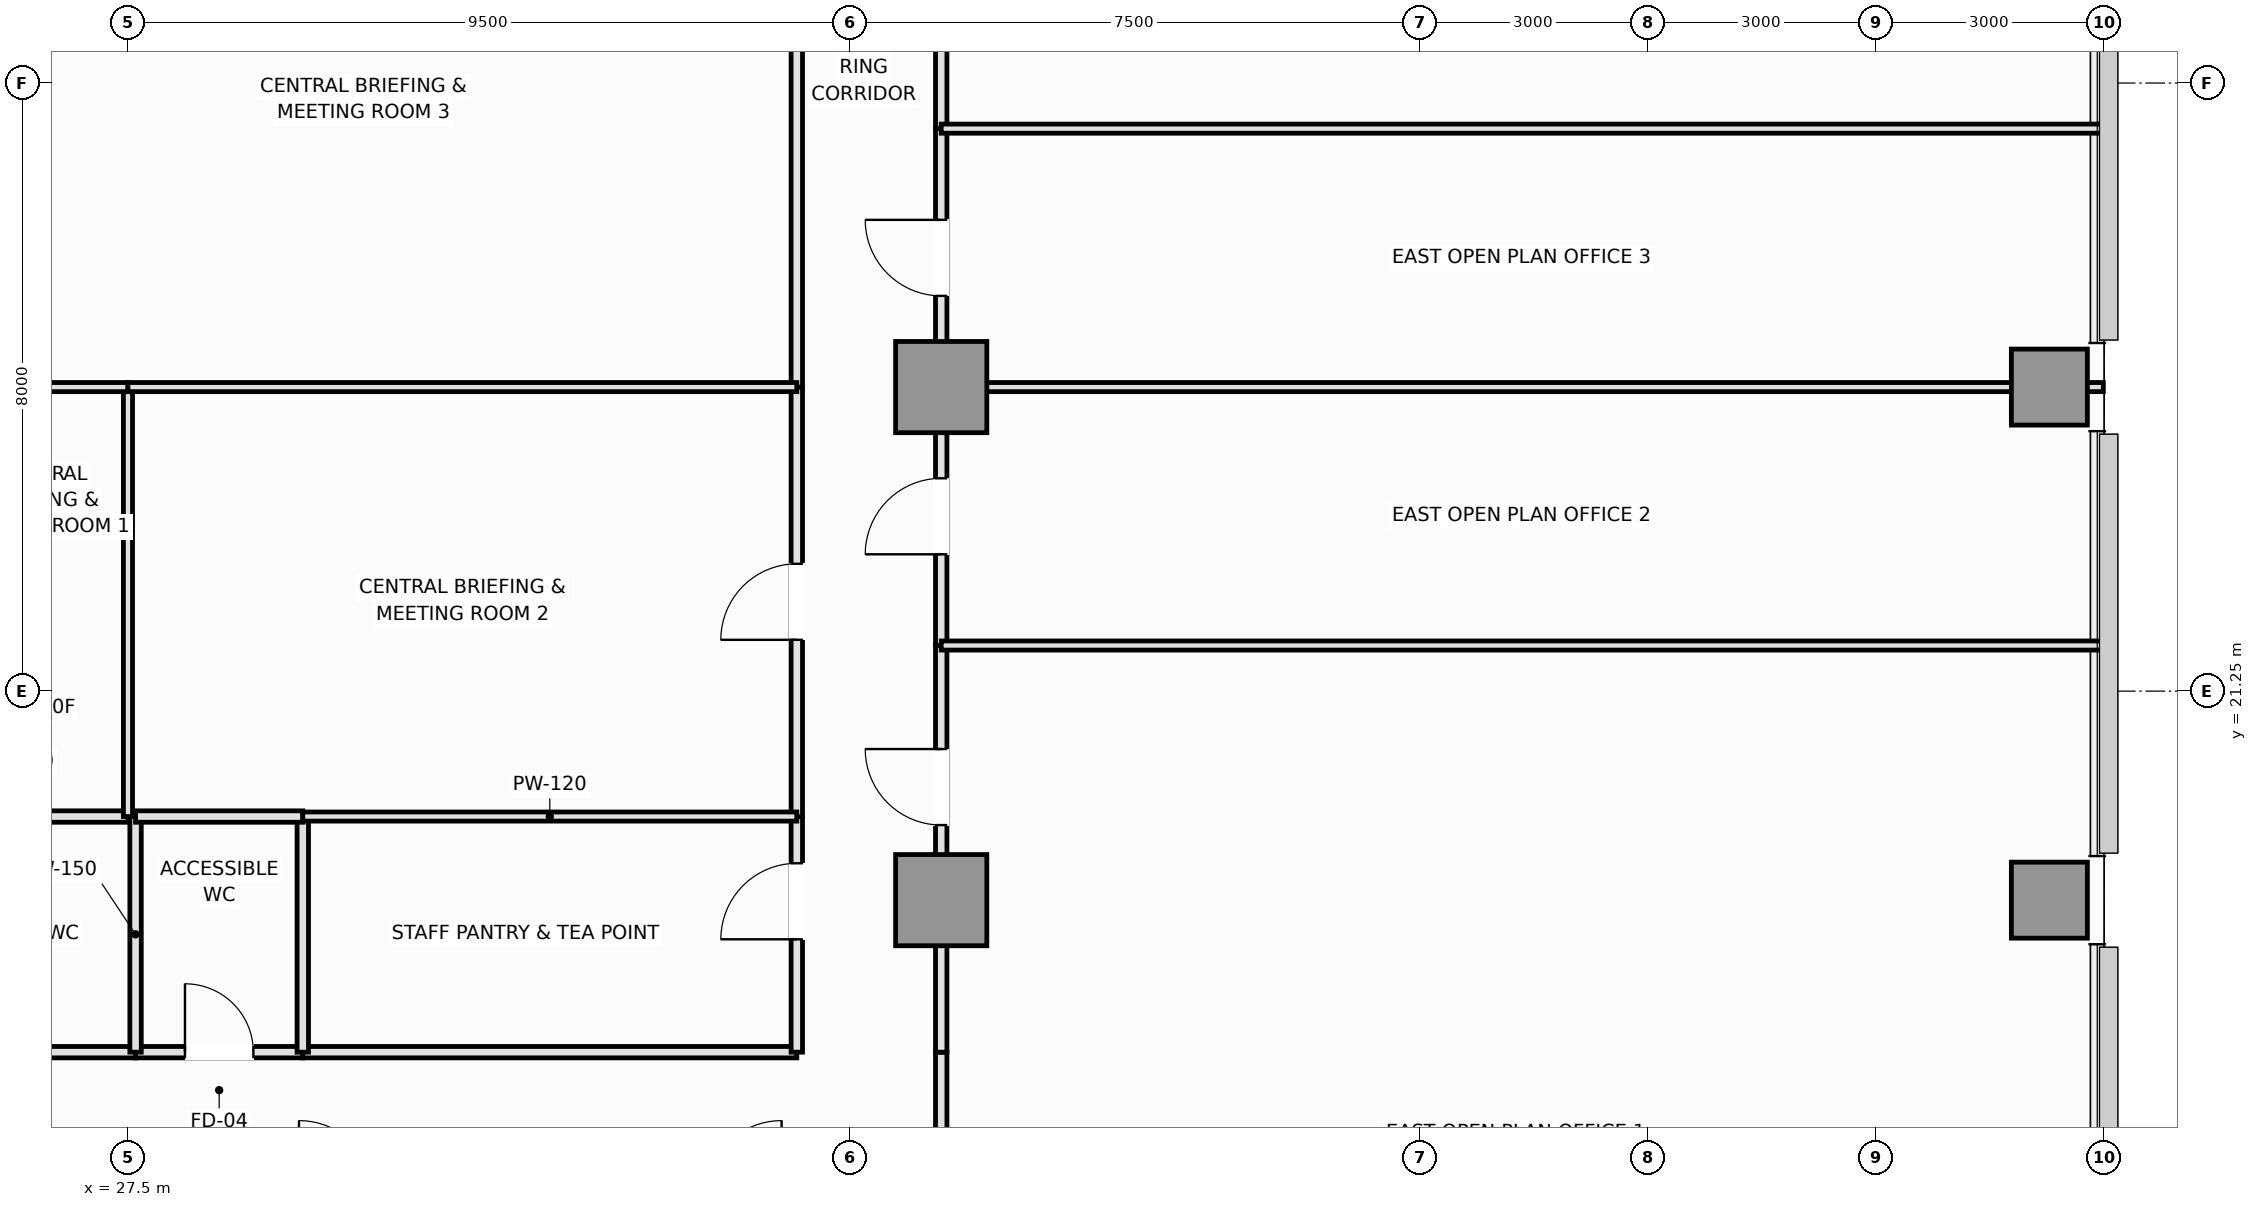
"""IFC4 building model, lengths in metres.
Left out: names, types, materials, properties, quantities, classifications, styles, units other than length and angle.
Written with IfcOpenShell. Run it as: python <this file> out.ifc"""

import sys

from ifc_helpers import new_model, si_unit, direction, frame, frame_2d, origin, origin_2d, place, context, subcontext, project, spatial, rectangle, extrude, element, fill, save


model = new_model("IFC4")
c1 = context("Model", 3, precision=1e-05, world=origin(), true_north=direction((0.0, 1.0)))
c2 = subcontext(c1, "Body", "Model", "MODEL_VIEW")
j1 = project(units=[si_unit("LENGTHUNIT", "METRE"), si_unit("PLANEANGLEUNIT", "RADIAN")], contexts=[c1])
p1 = place(None, origin())
s1 = spatial("IfcSite", under=j1, at=p1, CompositionType="ELEMENT")
p2 = place(p1, origin())
s2 = spatial("IfcBuilding", under=s1, at=p2, CompositionType="ELEMENT")
p3 = place(p2, frame((0.0, 0.0, 57.55)))
s3 = spatial("IfcBuildingStorey", under=s2, at=p3, CompositionType="ELEMENT", Elevation=57.55)
for number, where, z_axis, x_axis in (
    (1, (38.2, 18.5, 0.0), (0.0, 0.0, 1.0), (1.0, 0.0, 0.0)),
    (2, (38.2, 25.25, 0.0), (0.0, 0.0, 1.0), (1.0, 0.0, 0.0)),
):
    element("IfcColumn", number, at=place(p3, frame(where, z_axis=z_axis, x_axis=x_axis)), inside=s3, PredefinedType="COLUMN", context=c2, shape_type="SweptSolid", body=[
        extrude(rectangle(XDim=1.2, YDim=1.2, at=origin_2d()), origin(), (0.0, 0.0, 1.0), 3.55),
    ])
for number, where, z_axis, x_axis in (
    (3, (52.78, 18.5, 0.0), (0.0, 0.0, 1.0), (1.0, 0.0, 0.0)),
    (4, (52.78, 25.25, 0.0), (0.0, 0.0, 1.0), (1.0, 0.0, 0.0)),
):
    element("IfcColumn", number, at=place(p3, frame(where, z_axis=z_axis, x_axis=x_axis)), inside=s3, PredefinedType="COLUMN", context=c2, shape_type="SweptSolid", body=[
        extrude(rectangle(XDim=1.0, YDim=1.0, at=origin_2d()), origin(), (0.0, 0.0, 1.0), 3.55),
    ])
p4 = place(p3, frame((24.45, 16.5, 0.0), z_axis=(0.0, 0.0, 1.0), x_axis=(1.0, 0.0, 0.0)))
e5 = element("IfcWall", 5, at=p4, inside=s3, PredefinedType="PLUMBINGWALL", context=c2, shape_type="SweptSolid", body=[
    extrude(rectangle(XDim=3.15, YDim=0.15, at=frame_2d((1.575, 0.0))), origin(), (0.0, 0.0, 1.0), 3.37),
])
p5 = place(p3, frame((27.6, 16.5, 0.0), z_axis=(0.0, 0.0, 1.0), x_axis=(1.0, 0.0, 0.0)))
e6 = element("IfcWall", 6, at=p5, inside=s3, PredefinedType="PLUMBINGWALL", context=c2, shape_type="SweptSolid", body=[
    extrude(rectangle(XDim=2.2, YDim=0.15, at=frame_2d((1.1, 0.0))), origin(), (0.0, 0.0, 1.0), 3.37),
])
p6 = place(p5, frame((0.65, 0.0, 0.0)))
e7 = element("IfcOpeningElement", 7, at=p6, cuts=e6, PredefinedType="OPENING", context=c2, shape_type="SweptSolid", body=[
    extrude(rectangle(XDim=0.9, YDim=2.1, at=frame_2d((0.45, 1.05))), frame((0.0, 0.085, 0.0), z_axis=(0.0, -1.0, 0.0), x_axis=(1.0, 0.0, 0.0)), (0.0, 0.0, 1.0), 0.17),
])
p7 = place(p3, frame((29.8, 16.5, 0.0), z_axis=(0.0, 0.0, 1.0), x_axis=(1.0, 0.0, 0.0)))
e8 = element("IfcWall", 8, at=p7, inside=s3, PredefinedType="PARTITIONING", context=c2, shape_type="SweptSolid", body=[
    extrude(rectangle(XDim=6.5, YDim=0.15, at=frame_2d((3.25, 0.0))), origin(), (0.0, 0.0, 1.0), 3.37),
])
p8 = place(p3, frame((38.2, 14.6, 0.0), z_axis=(0.0, 0.0, 1.0), x_axis=(0.0, 1.0, 0.0)))
e9 = element("IfcWall", 9, at=p8, inside=s3, PredefinedType="PARTITIONING", context=c2, shape_type="SweptSolid", body=[
    extrude(rectangle(XDim=1.9, YDim=0.15, at=frame_2d((0.95, 0.0))), origin(), (0.0, 0.0, 1.0), 2.82),
])
p9 = place(p3, frame((36.3, 16.5, 0.0), z_axis=(0.0, 0.0, 1.0), x_axis=(0.0, 1.0, 0.0)))
e10 = element("IfcWall", 10, at=p9, inside=s3, PredefinedType="PARTITIONING", context=c2, shape_type="SweptSolid", body=[
    extrude(rectangle(XDim=3.1, YDim=0.15, at=frame_2d((1.55, 0.0))), origin(), (0.0, 0.0, 1.0), 3.37),
])
p10 = place(p9, frame((1.485, 0.0, 0.0)))
e11 = element("IfcOpeningElement", 11, at=p10, cuts=e10, PredefinedType="OPENING", context=c2, shape_type="SweptSolid", body=[
    extrude(rectangle(XDim=1.0, YDim=2.15, at=frame_2d((0.5, 1.075))), frame((0.0, 0.085, 0.0), z_axis=(0.0, -1.0, 0.0), x_axis=(1.0, 0.0, 0.0)), (0.0, 0.0, 1.0), 0.17),
])
p11 = place(p3, frame((36.3, 19.6, 0.0), z_axis=(0.0, 0.0, 1.0), x_axis=(0.0, 1.0, 0.0)))
e12 = element("IfcWall", 12, at=p11, inside=s3, PredefinedType="PARTITIONING", context=c2, shape_type="SweptSolid", body=[
    extrude(rectangle(XDim=5.65, YDim=0.15, at=frame_2d((2.825, 0.0))), origin(), (0.0, 0.0, 1.0), 3.37),
])
p12 = place(p11, frame((2.325, 0.0, 0.0)))
e13 = element("IfcOpeningElement", 13, at=p12, cuts=e12, PredefinedType="OPENING", context=c2, shape_type="SweptSolid", body=[
    extrude(rectangle(XDim=1.0, YDim=2.15, at=frame_2d((0.5, 1.075))), frame((0.0, 0.085, 0.0), z_axis=(0.0, -1.0, 0.0), x_axis=(1.0, 0.0, 0.0)), (0.0, 0.0, 1.0), 0.17),
])
p13 = place(p3, frame((36.3, 25.25, 0.0), z_axis=(0.0, 0.0, 1.0), x_axis=(0.0, 1.0, 0.0)))
e14 = element("IfcWall", 14, at=p13, inside=s3, PredefinedType="PARTITIONING", context=c2, shape_type="SweptSolid", body=[
    extrude(rectangle(XDim=7.55, YDim=0.15, at=frame_2d((3.775, 0.0))), origin(), (0.0, 0.0, 1.0), 3.37),
])
p14 = place(p3, frame((38.2, 16.5, 0.0), z_axis=(0.0, 0.0, 1.0), x_axis=(0.0, 1.0, 0.0)))
e15 = element("IfcWall", 15, at=p14, inside=s3, PredefinedType="PARTITIONING", context=c2, shape_type="SweptSolid", body=[
    extrude(rectangle(XDim=5.35, YDim=0.15, at=frame_2d((2.675, 0.0))), origin(), (0.0, 0.0, 1.0), 2.82),
])
p15 = place(p14, frame((2.988, 0.0, 0.0)))
e16 = element("IfcOpeningElement", 16, at=p15, cuts=e15, PredefinedType="OPENING", context=c2, shape_type="SweptSolid", body=[
    extrude(rectangle(XDim=1.0, YDim=2.15, at=frame_2d((0.5, 1.075))), frame((0.0, 0.085, 0.0), z_axis=(0.0, -1.0, 0.0), x_axis=(1.0, 0.0, 0.0)), (0.0, 0.0, 1.0), 0.17),
])
p16 = place(p3, frame((38.2, 21.85, 0.0), z_axis=(0.0, 0.0, 1.0), x_axis=(0.0, 1.0, 0.0)))
e17 = element("IfcWall", 17, at=p16, inside=s3, PredefinedType="PARTITIONING", context=c2, shape_type="SweptSolid", body=[
    extrude(rectangle(XDim=3.4, YDim=0.15, at=frame_2d((1.7, 0.0))), origin(), (0.0, 0.0, 1.0), 2.82),
])
p17 = place(p16, frame((1.2, 0.0, 0.0)))
e18 = element("IfcOpeningElement", 18, at=p17, cuts=e17, PredefinedType="OPENING", context=c2, shape_type="SweptSolid", body=[
    extrude(rectangle(XDim=1.0, YDim=2.15, at=frame_2d((0.5, 1.075))), frame((0.0, 0.085, 0.0), z_axis=(0.0, -1.0, 0.0), x_axis=(1.0, 0.0, 0.0)), (0.0, 0.0, 1.0), 0.17),
])
p18 = place(p3, frame((38.2, 25.25, 0.0), z_axis=(0.0, 0.0, 1.0), x_axis=(0.0, 1.0, 0.0)))
e19 = element("IfcWall", 19, at=p18, inside=s3, PredefinedType="PARTITIONING", context=c2, shape_type="SweptSolid", body=[
    extrude(rectangle(XDim=3.4, YDim=0.15, at=frame_2d((1.7, 0.0))), origin(), (0.0, 0.0, 1.0), 2.82),
])
p19 = place(p18, frame((1.2, 0.0, 0.0)))
e20 = element("IfcOpeningElement", 20, at=p19, cuts=e19, PredefinedType="OPENING", context=c2, shape_type="SweptSolid", body=[
    extrude(rectangle(XDim=1.0, YDim=2.15, at=frame_2d((0.5, 1.075))), frame((0.0, 0.085, 0.0), z_axis=(0.0, -1.0, 0.0), x_axis=(1.0, 0.0, 0.0)), (0.0, 0.0, 1.0), 0.17),
])
p20 = place(p3, frame((38.2, 28.65, 0.0), z_axis=(0.0, 0.0, 1.0), x_axis=(0.0, 1.0, 0.0)))
e21 = element("IfcWall", 21, at=p20, inside=s3, PredefinedType="PARTITIONING", context=c2, shape_type="SweptSolid", body=[
    extrude(rectangle(XDim=7.25, YDim=0.15, at=frame_2d((3.625, 0.0))), origin(), (0.0, 0.0, 1.0), 2.82),
])
p21 = place(p20, frame((4.303, 0.0, 0.0)))
e22 = element("IfcOpeningElement", 22, at=p21, cuts=e21, PredefinedType="OPENING", context=c2, shape_type="SweptSolid", body=[
    extrude(rectangle(XDim=1.0, YDim=2.15, at=frame_2d((0.5, 1.075))), frame((0.0, 0.085, 0.0), z_axis=(0.0, -1.0, 0.0), x_axis=(1.0, 0.0, 0.0)), (0.0, 0.0, 1.0), 0.17),
])
p22 = place(p3, frame((27.6, 16.5, 0.0), z_axis=(0.0, 0.0, 1.0), x_axis=(0.0, 1.0, 0.0)))
e23 = element("IfcWall", 23, at=p22, inside=s3, PredefinedType="PLUMBINGWALL", context=c2, shape_type="SweptSolid", body=[
    extrude(rectangle(XDim=3.1, YDim=0.15, at=frame_2d((1.55, 0.0))), origin(), (0.0, 0.0, 1.0), 3.37),
])
p23 = place(p3, frame((24.45, 19.6, 0.0), z_axis=(0.0, 0.0, 1.0), x_axis=(1.0, 0.0, 0.0)))
e24 = element("IfcWall", 24, at=p23, inside=s3, PredefinedType="PLUMBINGWALL", context=c2, shape_type="SweptSolid", body=[
    extrude(rectangle(XDim=3.05, YDim=0.15, at=frame_2d((1.525, 0.0))), origin(), (0.0, 0.0, 1.0), 3.37),
])
p24 = place(p3, frame((29.8, 16.5, 0.0), z_axis=(0.0, 0.0, 1.0), x_axis=(0.0, 1.0, 0.0)))
e25 = element("IfcWall", 25, at=p24, inside=s3, PredefinedType="PLUMBINGWALL", context=c2, shape_type="SweptSolid", body=[
    extrude(rectangle(XDim=3.1, YDim=0.15, at=frame_2d((1.55, 0.0))), origin(), (0.0, 0.0, 1.0), 3.37),
])
p25 = place(p3, frame((27.6, 19.6, 0.0), z_axis=(0.0, 0.0, 1.0), x_axis=(1.0, 0.0, 0.0)))
e26 = element("IfcWall", 26, at=p25, inside=s3, PredefinedType="PLUMBINGWALL", context=c2, shape_type="SweptSolid", body=[
    extrude(rectangle(XDim=2.2, YDim=0.15, at=frame_2d((1.1, 0.0))), origin(), (0.0, 0.0, 1.0), 3.37),
])
p26 = place(p3, frame((29.8, 19.6, 0.0), z_axis=(0.0, 0.0, 1.0), x_axis=(1.0, 0.0, 0.0)))
e27 = element("IfcWall", 27, at=p26, inside=s3, PredefinedType="PARTITIONING", context=c2, shape_type="SweptSolid", body=[
    extrude(rectangle(XDim=6.5, YDim=0.12, at=frame_2d((3.25, 0.0))), origin(), (0.0, 0.0, 1.0), 3.37),
])
p27 = place(p3, frame((27.5, 19.6, 0.0), z_axis=(0.0, 0.0, 1.0), x_axis=(0.0, 1.0, 0.0)))
e28 = element("IfcWall", 28, at=p27, inside=s3, PredefinedType="PARTITIONING", context=c2, shape_type="SweptSolid", body=[
    extrude(rectangle(XDim=5.65, YDim=0.12, at=frame_2d((2.825, 0.0))), origin(), (0.0, 0.0, 1.0), 3.37),
])
p28 = place(p3, frame((24.45, 25.25, 0.0), z_axis=(0.0, 0.0, 1.0), x_axis=(1.0, 0.0, 0.0)))
e29 = element("IfcWall", 29, at=p28, inside=s3, PredefinedType="PARTITIONING", context=c2, shape_type="SweptSolid", body=[
    extrude(rectangle(XDim=3.05, YDim=0.12, at=frame_2d((1.525, 0.0))), origin(), (0.0, 0.0, 1.0), 2.72),
])
p29 = place(p3, frame((27.5, 25.25, 0.0), z_axis=(0.0, 0.0, 1.0), x_axis=(1.0, 0.0, 0.0)))
e30 = element("IfcWall", 30, at=p29, inside=s3, PredefinedType="PARTITIONING", context=c2, shape_type="SweptSolid", body=[
    extrude(rectangle(XDim=8.8, YDim=0.12, at=frame_2d((4.4, 0.0))), origin(), (0.0, 0.0, 1.0), 2.72),
])
p30 = place(p3, frame((38.2, 21.85, 0.0), z_axis=(0.0, 0.0, 1.0), x_axis=(1.0, 0.0, 0.0)))
e31 = element("IfcWall", 31, at=p30, inside=s3, PredefinedType="PARTITIONING", context=c2, shape_type="SweptSolid", body=[
    extrude(rectangle(XDim=15.29, YDim=0.12, at=frame_2d((7.645, 0.0))), origin(), (0.0, 0.0, 1.0), 3.37),
])
p31 = place(p3, frame((38.2, 25.25, 0.0), z_axis=(0.0, 0.0, 1.0), x_axis=(1.0, 0.0, 0.0)))
e32 = element("IfcWall", 32, at=p31, inside=s3, PredefinedType="PARTITIONING", context=c2, shape_type="SweptSolid", body=[
    extrude(rectangle(XDim=15.29, YDim=0.12, at=frame_2d((7.645, 0.0))), origin(), (0.0, 0.0, 1.0), 2.72),
])
p32 = place(p3, frame((38.2, 28.65, 0.0), z_axis=(0.0, 0.0, 1.0), x_axis=(1.0, 0.0, 0.0)))
e33 = element("IfcWall", 33, at=p32, inside=s3, PredefinedType="PARTITIONING", context=c2, shape_type="SweptSolid", body=[
    extrude(rectangle(XDim=15.29, YDim=0.12, at=frame_2d((7.645, 0.0))), origin(), (0.0, 0.0, 1.0), 3.37),
])
p33 = place(p6, origin())
e34 = element("IfcDoor", 34, at=p33, inside=s3, OperationType="SINGLE_SWING_LEFT", PredefinedType="DOOR", context=c2, shape_type="SweptSolid", body=[
    extrude(rectangle(XDim=0.9, YDim=2.1, at=frame_2d((0.45, 1.05))), frame((0.0, 0.025, 0.0), z_axis=(0.0, -1.0, 0.0), x_axis=(1.0, 0.0, 0.0)), (0.0, 0.0, 1.0), 0.05),
])
fill(e7, e34)
p34 = place(p10, origin())
e35 = element("IfcDoor", 35, at=p34, inside=s3, OperationType="SINGLE_SWING_LEFT", PredefinedType="DOOR", context=c2, shape_type="SweptSolid", body=[
    extrude(rectangle(XDim=1.0, YDim=2.15, at=frame_2d((0.5, 1.075))), frame((0.0, 0.025, 0.0), z_axis=(0.0, -1.0, 0.0), x_axis=(1.0, 0.0, 0.0)), (0.0, 0.0, 1.0), 0.05),
])
fill(e11, e35)
p35 = place(p12, origin())
e36 = element("IfcDoor", 36, at=p35, inside=s3, OperationType="SINGLE_SWING_LEFT", PredefinedType="DOOR", context=c2, shape_type="SweptSolid", body=[
    extrude(rectangle(XDim=1.0, YDim=2.15, at=frame_2d((0.5, 1.075))), frame((0.0, 0.025, 0.0), z_axis=(0.0, -1.0, 0.0), x_axis=(1.0, 0.0, 0.0)), (0.0, 0.0, 1.0), 0.05),
])
fill(e13, e36)
p36 = place(p15, origin())
e37 = element("IfcDoor", 37, at=p36, inside=s3, OperationType="SINGLE_SWING_RIGHT", PredefinedType="DOOR", context=c2, shape_type="SweptSolid", body=[
    extrude(rectangle(XDim=1.0, YDim=2.15, at=frame_2d((0.5, 1.075))), frame((0.0, 0.025, 0.0), z_axis=(0.0, -1.0, 0.0), x_axis=(1.0, 0.0, 0.0)), (0.0, 0.0, 1.0), 0.05),
])
fill(e16, e37)
p37 = place(p17, origin())
e38 = element("IfcDoor", 38, at=p37, inside=s3, OperationType="SINGLE_SWING_LEFT", PredefinedType="DOOR", context=c2, shape_type="SweptSolid", body=[
    extrude(rectangle(XDim=1.0, YDim=2.15, at=frame_2d((0.5, 1.075))), frame((0.0, 0.025, 0.0), z_axis=(0.0, -1.0, 0.0), x_axis=(1.0, 0.0, 0.0)), (0.0, 0.0, 1.0), 0.05),
])
fill(e18, e38)
p38 = place(p19, origin())
e39 = element("IfcDoor", 39, at=p38, inside=s3, OperationType="SINGLE_SWING_RIGHT", PredefinedType="DOOR", context=c2, shape_type="SweptSolid", body=[
    extrude(rectangle(XDim=1.0, YDim=2.15, at=frame_2d((0.5, 1.075))), frame((0.0, 0.025, 0.0), z_axis=(0.0, -1.0, 0.0), x_axis=(1.0, 0.0, 0.0)), (0.0, 0.0, 1.0), 0.05),
])
fill(e20, e39)
save(model, sys.argv[1])
